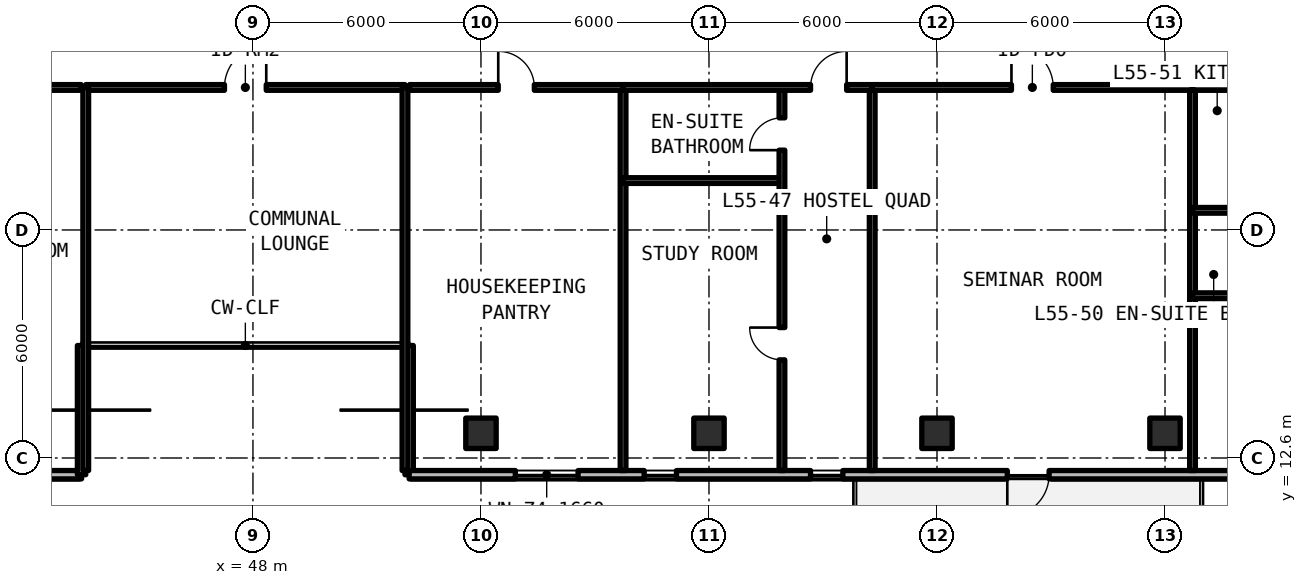
"""IFC4 building model, lengths in metres.
Left out: names, types, materials, properties, quantities, classifications, styles, units other than length and angle.
Written with IfcOpenShell. Run it as: python <this file> out.ifc"""

import sys

from ifc_helpers import new_model, si_unit, direction, frame, frame_2d, origin, origin_2d, place, context, subcontext, project, spatial, rectangle, extrude, element, fill, save


model = new_model("IFC4")
c1 = context("Model", 3, precision=1e-05, world=origin(), true_north=direction((0.0, 1.0)))
c2 = subcontext(c1, "Body", "Model", "MODEL_VIEW")
j1 = project(units=[si_unit("LENGTHUNIT", "METRE"), si_unit("PLANEANGLEUNIT", "RADIAN")], contexts=[c1])
p1 = place(None, origin())
s1 = spatial("IfcSite", under=j1, at=p1, CompositionType="ELEMENT")
p2 = place(p1, origin())
s2 = spatial("IfcBuilding", under=s1, at=p2, CompositionType="ELEMENT")
p3 = place(p2, frame((0.0, 0.0, 198.33)))
s3 = spatial("IfcBuildingStorey", under=s2, at=p3, CompositionType="ELEMENT", Elevation=198.33)
for number, where, z_axis, x_axis in (
    (1, (54.0, 13.25, 0.0), (0.0, 0.0, 1.0), (1.0, 0.0, 0.0)),
    (2, (60.0, 13.25, 0.0), (0.0, 0.0, 1.0), (1.0, 0.0, 0.0)),
    (3, (66.0, 13.25, 0.0), (0.0, 0.0, 1.0), (1.0, 0.0, 0.0)),
    (4, (72.0, 13.25, 0.0), (0.0, 0.0, 1.0), (1.0, 0.0, 0.0)),
):
    element("IfcColumn", number, at=place(p3, frame(where, z_axis=z_axis, x_axis=x_axis)), inside=s3, PredefinedType="COLUMN", context=c2, shape_type="SweptSolid", body=[
        extrude(rectangle(XDim=0.8, YDim=0.8, at=origin_2d()), origin(), (0.0, 0.0, 1.0), 3.3),
    ])
p4 = place(p3, frame((25.846, 12.16, 0.0), z_axis=(0.0, 0.0, 1.0), x_axis=(1.0, 0.0, 0.0)))
e5 = element("IfcWall", 5, at=p4, inside=s3, PredefinedType="SOLIDWALL", context=c2, shape_type="SweptSolid", body=[
    extrude(rectangle(XDim=17.644, YDim=0.22, at=frame_2d((8.822, 0.0))), origin(), (0.0, 0.0, 1.0), 3.08),
])
p5 = place(p4, frame((7.204, 0.0, 0.0)))
e6 = element("IfcOpeningElement", 6, at=p5, cuts=e5, PredefinedType="OPENING", context=c2, shape_type="SweptSolid", body=[
    extrude(rectangle(XDim=1.1, YDim=2.15, at=frame_2d((0.55, 1.075))), frame((0.0, 0.12, 0.0), z_axis=(0.0, -1.0, 0.0), x_axis=(1.0, 0.0, 0.0)), (0.0, 0.0, 1.0), 0.24),
])
p6 = place(p4, frame((0.664, 0.0, 0.78)))
e7 = element("IfcOpeningElement", 7, at=p6, cuts=e5, PredefinedType="OPENING", context=c2, shape_type="SweptSolid", body=[
    extrude(rectangle(XDim=0.85, YDim=1.65, at=frame_2d((0.425, 0.825))), frame((0.0, 0.12, 0.0), z_axis=(0.0, -1.0, 0.0), x_axis=(1.0, 0.0, 0.0)), (0.0, 0.0, 1.0), 0.24),
])
p7 = place(p4, frame((2.636, 0.0, 0.78)))
e8 = element("IfcOpeningElement", 8, at=p7, cuts=e5, PredefinedType="OPENING", context=c2, shape_type="SweptSolid", body=[
    extrude(rectangle(XDim=0.85, YDim=1.65, at=frame_2d((0.425, 0.825))), frame((0.0, 0.12, 0.0), z_axis=(0.0, -1.0, 0.0), x_axis=(1.0, 0.0, 0.0)), (0.0, 0.0, 1.0), 0.24),
])
p8 = place(p4, frame((10.993, 0.0, 0.78)))
e9 = element("IfcOpeningElement", 9, at=p8, cuts=e5, PredefinedType="OPENING", context=c2, shape_type="SweptSolid", body=[
    extrude(rectangle(XDim=0.85, YDim=1.65, at=frame_2d((0.425, 0.825))), frame((0.0, 0.12, 0.0), z_axis=(0.0, -1.0, 0.0), x_axis=(1.0, 0.0, 0.0)), (0.0, 0.0, 1.0), 0.24),
])
p9 = place(p4, frame((14.699, 0.0, 0.78)))
e10 = element("IfcOpeningElement", 10, at=p9, cuts=e5, PredefinedType="OPENING", context=c2, shape_type="SweptSolid", body=[
    extrude(rectangle(XDim=0.85, YDim=1.65, at=frame_2d((0.425, 0.825))), frame((0.0, 0.12, 0.0), z_axis=(0.0, -1.0, 0.0), x_axis=(1.0, 0.0, 0.0)), (0.0, 0.0, 1.0), 0.24),
])
for number, where, z_axis, x_axis in (
    (11, (43.49, 12.16, 0.0), (0.0, 0.0, 1.0), (0.0, 1.0, 0.0)),
    (12, (52.11, 15.56, 0.0), (0.0, 0.0, 1.0), (0.0, -1.0, 0.0)),
):
    element("IfcWall", number, at=place(p3, frame(where, z_axis=z_axis, x_axis=x_axis)), inside=s3, PredefinedType="SOLIDWALL", context=c2, shape_type="SweptSolid", body=[
        extrude(rectangle(XDim=3.4, YDim=0.22, at=frame_2d((1.7, 0.0))), origin(), (0.0, 0.0, 1.0), 3.08),
    ])
p10 = place(p3, frame((52.11, 12.16, 0.0), z_axis=(0.0, 0.0, 1.0), x_axis=(1.0, 0.0, 0.0)))
e13 = element("IfcWall", 13, at=p10, inside=s3, PredefinedType="SOLIDWALL", context=c2, shape_type="SweptSolid", body=[
    extrude(rectangle(XDim=43.244, YDim=0.22, at=frame_2d((21.622, 0.0))), origin(), (0.0, 0.0, 1.0), 3.08),
])
p11 = place(p10, frame((15.74, 0.0, 0.0)))
e14 = element("IfcOpeningElement", 14, at=p11, cuts=e13, PredefinedType="OPENING", context=c2, shape_type="SweptSolid", body=[
    extrude(rectangle(XDim=1.1, YDim=2.15, at=frame_2d((0.55, 1.075))), frame((0.0, 0.12, 0.0), z_axis=(0.0, -1.0, 0.0), x_axis=(1.0, 0.0, 0.0)), (0.0, 0.0, 1.0), 0.24),
])
p12 = place(p10, frame((27.59, 0.0, 0.0)))
e15 = element("IfcOpeningElement", 15, at=p12, cuts=e13, PredefinedType="OPENING", context=c2, shape_type="SweptSolid", body=[
    extrude(rectangle(XDim=1.1, YDim=2.15, at=frame_2d((0.55, 1.075))), frame((0.0, 0.12, 0.0), z_axis=(0.0, -1.0, 0.0), x_axis=(1.0, 0.0, 0.0)), (0.0, 0.0, 1.0), 0.24),
])
p13 = place(p10, frame((2.795, 0.0, 0.78)))
e16 = element("IfcOpeningElement", 16, at=p13, cuts=e13, PredefinedType="OPENING", context=c2, shape_type="SweptSolid", body=[
    extrude(rectangle(XDim=1.65, YDim=1.66, at=frame_2d((0.825, 0.83))), frame((0.0, 0.12, 0.0), z_axis=(0.0, -1.0, 0.0), x_axis=(1.0, 0.0, 0.0)), (0.0, 0.0, 1.0), 0.24),
])
p14 = place(p10, frame((6.185, 0.0, 0.78)))
e17 = element("IfcOpeningElement", 17, at=p14, cuts=e13, PredefinedType="OPENING", context=c2, shape_type="SweptSolid", body=[
    extrude(rectangle(XDim=0.85, YDim=1.65, at=frame_2d((0.425, 0.825))), frame((0.0, 0.12, 0.0), z_axis=(0.0, -1.0, 0.0), x_axis=(1.0, 0.0, 0.0)), (0.0, 0.0, 1.0), 0.24),
])
p15 = place(p10, frame((10.562, 0.0, 0.78)))
e18 = element("IfcOpeningElement", 18, at=p15, cuts=e13, PredefinedType="OPENING", context=c2, shape_type="SweptSolid", body=[
    extrude(rectangle(XDim=0.85, YDim=1.65, at=frame_2d((0.425, 0.825))), frame((0.0, 0.12, 0.0), z_axis=(0.0, -1.0, 0.0), x_axis=(1.0, 0.0, 0.0)), (0.0, 0.0, 1.0), 0.24),
])
p16 = place(p10, frame((22.949, 0.0, 0.78)))
e19 = element("IfcOpeningElement", 19, at=p16, cuts=e13, PredefinedType="OPENING", context=c2, shape_type="SweptSolid", body=[
    extrude(rectangle(XDim=1.65, YDim=1.66, at=frame_2d((0.825, 0.83))), frame((0.0, 0.12, 0.0), z_axis=(0.0, -1.0, 0.0), x_axis=(1.0, 0.0, 0.0)), (0.0, 0.0, 1.0), 0.24),
])
p17 = place(p10, frame((33.573, 0.0, 0.78)))
e20 = element("IfcOpeningElement", 20, at=p17, cuts=e13, PredefinedType="OPENING", context=c2, shape_type="SweptSolid", body=[
    extrude(rectangle(XDim=1.65, YDim=1.66, at=frame_2d((0.825, 0.83))), frame((0.0, 0.12, 0.0), z_axis=(0.0, -1.0, 0.0), x_axis=(1.0, 0.0, 0.0)), (0.0, 0.0, 1.0), 0.24),
])
p18 = place(p10, frame((38.514, 0.0, 0.78)))
e21 = element("IfcOpeningElement", 21, at=p18, cuts=e13, PredefinedType="OPENING", context=c2, shape_type="SweptSolid", body=[
    extrude(rectangle(XDim=0.85, YDim=1.65, at=frame_2d((0.425, 0.825))), frame((0.0, 0.12, 0.0), z_axis=(0.0, -1.0, 0.0), x_axis=(1.0, 0.0, 0.0)), (0.0, 0.0, 1.0), 0.24),
])
p19 = place(p10, frame((40.615, 0.0, 0.78)))
e22 = element("IfcOpeningElement", 22, at=p19, cuts=e13, PredefinedType="OPENING", context=c2, shape_type="SweptSolid", body=[
    extrude(rectangle(XDim=1.65, YDim=1.66, at=frame_2d((0.825, 0.83))), frame((0.0, 0.12, 0.0), z_axis=(0.0, -1.0, 0.0), x_axis=(1.0, 0.0, 0.0)), (0.0, 0.0, 1.0), 0.24),
])
p20 = place(p3, frame((43.6, 22.35, 0.0), z_axis=(0.0, 0.0, 1.0), x_axis=(1.0, 0.0, 0.0)))
e23 = element("IfcWall", 23, at=p20, inside=s3, PredefinedType="SOLIDWALL", context=c2, shape_type="SweptSolid", body=[
    extrude(rectangle(XDim=8.4, YDim=0.15, at=frame_2d((4.2, 0.0))), origin(), (0.0, 0.0, 1.0), 2.35),
])
p21 = place(p20, frame((3.65, 0.0, 0.0)))
e24 = element("IfcOpeningElement", 24, at=p21, cuts=e23, PredefinedType="OPENING", context=c2, shape_type="SweptSolid", body=[
    extrude(rectangle(XDim=1.1, YDim=2.15, at=frame_2d((0.55, 1.075))), frame((0.0, 0.085, 0.0), z_axis=(0.0, -1.0, 0.0), x_axis=(1.0, 0.0, 0.0)), (0.0, 0.0, 1.0), 0.17),
])
for number, where, z_axis, x_axis in (
    (25, (43.6, 12.27, 0.0), (0.0, 0.0, 1.0), (0.0, 1.0, 0.0)),
    (26, (52.0, 12.27, 0.0), (0.0, 0.0, 1.0), (0.0, 1.0, 0.0)),
):
    element("IfcWall", number, at=place(p3, frame(where, z_axis=z_axis, x_axis=x_axis)), inside=s3, PredefinedType="SOLIDWALL", context=c2, shape_type="SweptSolid", body=[
        extrude(rectangle(XDim=10.08, YDim=0.15, at=frame_2d((5.04, 0.0))), origin(), (0.0, 0.0, 1.0), 2.35),
    ])
p22 = place(p3, frame((38.713, 22.35, 0.0), z_axis=(0.0, 0.0, 1.0), x_axis=(1.0, 0.0, 0.0)))
e27 = element("IfcWall", 27, at=p22, inside=s3, PredefinedType="SOLIDWALL", context=c2, shape_type="SweptSolid", body=[
    extrude(rectangle(XDim=4.767, YDim=0.15, at=frame_2d((2.384, 0.0))), origin(), (0.0, 0.0, 1.0), 2.35),
])
p23 = place(p22, frame((2.632, 0.0, 0.0)))
e28 = element("IfcOpeningElement", 28, at=p23, cuts=e27, PredefinedType="OPENING", context=c2, shape_type="SweptSolid", body=[
    extrude(rectangle(XDim=0.95, YDim=2.15, at=frame_2d((0.475, 1.075))), frame((0.0, 0.085, 0.0), z_axis=(0.0, -1.0, 0.0), x_axis=(1.0, 0.0, 0.0)), (0.0, 0.0, 1.0), 0.17),
])
p24 = place(p3, frame((57.739, 12.27, 0.0), z_axis=(0.0, 0.0, 1.0), x_axis=(0.0, 1.0, 0.0)))
e29 = element("IfcWall", 29, at=p24, inside=s3, PredefinedType="SOLIDWALL", context=c2, shape_type="SweptSolid", body=[
    extrude(rectangle(XDim=10.08, YDim=0.15, at=frame_2d((5.04, 0.0))), origin(), (0.0, 0.0, 1.0), 2.35),
])
p25 = place(p3, frame((52.12, 22.35, 0.0), z_axis=(0.0, 0.0, 1.0), x_axis=(1.0, 0.0, 0.0)))
e30 = element("IfcWall", 30, at=p25, inside=s3, PredefinedType="SOLIDWALL", context=c2, shape_type="SweptSolid", body=[
    extrude(rectangle(XDim=5.619, YDim=0.15, at=frame_2d((2.81, 0.0))), origin(), (0.0, 0.0, 1.0), 2.35),
])
p26 = place(p25, frame((2.335, 0.0, 0.0)))
e31 = element("IfcOpeningElement", 31, at=p26, cuts=e30, PredefinedType="OPENING", context=c2, shape_type="SweptSolid", body=[
    extrude(rectangle(XDim=0.95, YDim=2.15, at=frame_2d((0.475, 1.075))), frame((0.0, 0.085, 0.0), z_axis=(0.0, -1.0, 0.0), x_axis=(1.0, 0.0, 0.0)), (0.0, 0.0, 1.0), 0.17),
])
p27 = place(p3, frame((64.295, 12.27, 0.0), z_axis=(0.0, 0.0, 1.0), x_axis=(0.0, 1.0, 0.0)))
e32 = element("IfcWall", 32, at=p27, inside=s3, PredefinedType="SOLIDWALL", context=c2, shape_type="SweptSolid", body=[
    extrude(rectangle(XDim=10.08, YDim=0.15, at=frame_2d((5.04, 0.0))), origin(), (0.0, 0.0, 1.0), 2.35),
])
p28 = place(p3, frame((57.739, 19.9, 0.0), z_axis=(0.0, 0.0, 1.0), x_axis=(1.0, 0.0, 0.0)))
e33 = element("IfcWall", 33, at=p28, inside=s3, PredefinedType="PARTITIONING", context=c2, shape_type="SweptSolid", body=[
    extrude(rectangle(XDim=4.181, YDim=0.15, at=frame_2d((2.09, 0.0))), origin(), (0.0, 0.0, 1.0), 2.35),
])
p29 = place(p3, frame((61.92, 12.27, 0.0), z_axis=(0.0, 0.0, 1.0), x_axis=(0.0, 1.0, 0.0)))
e34 = element("IfcWall", 34, at=p29, inside=s3, PredefinedType="PARTITIONING", context=c2, shape_type="SweptSolid", body=[
    extrude(rectangle(XDim=10.08, YDim=0.15, at=frame_2d((5.04, 0.0))), origin(), (0.0, 0.0, 1.0), 2.35),
])
p30 = place(p29, frame((2.912, 0.0, 0.0)))
e35 = element("IfcOpeningElement", 35, at=p30, cuts=e34, PredefinedType="OPENING", context=c2, shape_type="SweptSolid", body=[
    extrude(rectangle(XDim=0.85, YDim=2.1, at=frame_2d((0.425, 1.05))), frame((0.0, 0.085, 0.0), z_axis=(0.0, -1.0, 0.0), x_axis=(1.0, 0.0, 0.0)), (0.0, 0.0, 1.0), 0.17),
])
p31 = place(p29, frame((8.43, 0.0, 0.0)))
e36 = element("IfcOpeningElement", 36, at=p31, cuts=e34, PredefinedType="OPENING", context=c2, shape_type="SweptSolid", body=[
    extrude(rectangle(XDim=0.85, YDim=2.1, at=frame_2d((0.425, 1.05))), frame((0.0, 0.085, 0.0), z_axis=(0.0, -1.0, 0.0), x_axis=(1.0, 0.0, 0.0)), (0.0, 0.0, 1.0), 0.17),
])
p32 = place(p3, frame((57.739, 22.35, 0.0), z_axis=(0.0, 0.0, 1.0), x_axis=(1.0, 0.0, 0.0)))
e37 = element("IfcWall", 37, at=p32, inside=s3, PredefinedType="SOLIDWALL", context=c2, shape_type="SweptSolid", body=[
    extrude(rectangle(XDim=6.556, YDim=0.15, at=frame_2d((3.278, 0.0))), origin(), (0.0, 0.0, 1.0), 2.35),
])
p33 = place(p32, frame((4.933, 0.0, 0.0)))
e38 = element("IfcOpeningElement", 38, at=p33, cuts=e37, PredefinedType="OPENING", context=c2, shape_type="SweptSolid", body=[
    extrude(rectangle(XDim=0.95, YDim=2.15, at=frame_2d((0.475, 1.075))), frame((0.0, 0.085, 0.0), z_axis=(0.0, -1.0, 0.0), x_axis=(1.0, 0.0, 0.0)), (0.0, 0.0, 1.0), 0.17),
])
p34 = place(p3, frame((72.723, 12.27, 0.0), z_axis=(0.0, 0.0, 1.0), x_axis=(0.0, 1.0, 0.0)))
e39 = element("IfcWall", 39, at=p34, inside=s3, PredefinedType="SOLIDWALL", context=c2, shape_type="SweptSolid", body=[
    extrude(rectangle(XDim=10.08, YDim=0.15, at=frame_2d((5.04, 0.0))), origin(), (0.0, 0.0, 1.0), 2.35),
])
p35 = place(p3, frame((64.295, 22.35, 0.0), z_axis=(0.0, 0.0, 1.0), x_axis=(1.0, 0.0, 0.0)))
e40 = element("IfcWall", 40, at=p35, inside=s3, PredefinedType="SOLIDWALL", context=c2, shape_type="SweptSolid", body=[
    extrude(rectangle(XDim=8.428, YDim=0.15, at=frame_2d((4.214, 0.0))), origin(), (0.0, 0.0, 1.0), 2.35),
])
p36 = place(p35, frame((3.664, 0.0, 0.0)))
e41 = element("IfcOpeningElement", 41, at=p36, cuts=e40, PredefinedType="OPENING", context=c2, shape_type="SweptSolid", body=[
    extrude(rectangle(XDim=1.1, YDim=2.15, at=frame_2d((0.55, 1.075))), frame((0.0, 0.085, 0.0), z_axis=(0.0, -1.0, 0.0), x_axis=(1.0, 0.0, 0.0)), (0.0, 0.0, 1.0), 0.17),
])
p37 = place(p3, frame((72.723, 19.117, 0.0), z_axis=(0.0, 0.0, 1.0), x_axis=(1.0, 0.0, 0.0)))
e42 = element("IfcWall", 42, at=p37, inside=s3, PredefinedType="PARTITIONING", context=c2, shape_type="SweptSolid", body=[
    extrude(rectangle(XDim=2.149, YDim=0.15, at=frame_2d((1.075, 0.0))), origin(), (0.0, 0.0, 1.0), 2.35),
])
p38 = place(p3, frame((72.723, 16.87, 0.0), z_axis=(0.0, 0.0, 1.0), x_axis=(1.0, 0.0, 0.0)))
e43 = element("IfcWall", 43, at=p38, inside=s3, PredefinedType="PARTITIONING", context=c2, shape_type="SweptSolid", body=[
    extrude(rectangle(XDim=6.322, YDim=0.15, at=frame_2d((3.161, 0.0))), origin(), (0.0, 0.0, 1.0), 2.35),
])
p39 = place(p38, frame((3.85, 0.0, 0.0)))
e44 = element("IfcOpeningElement", 44, at=p39, cuts=e43, PredefinedType="OPENING", context=c2, shape_type="SweptSolid", body=[
    extrude(rectangle(XDim=0.85, YDim=2.1, at=frame_2d((0.425, 1.05))), frame((0.0, 0.085, 0.0), z_axis=(0.0, -1.0, 0.0), x_axis=(1.0, 0.0, 0.0)), (0.0, 0.0, 1.0), 0.17),
])
p40 = place(p3, frame((72.723, 22.35, 0.0), z_axis=(0.0, 0.0, 1.0), x_axis=(1.0, 0.0, 0.0)))
e45 = element("IfcWall", 45, at=p40, inside=s3, PredefinedType="SOLIDWALL", context=c2, shape_type="SweptSolid", body=[
    extrude(rectangle(XDim=6.322, YDim=0.15, at=frame_2d((3.161, 0.0))), origin(), (0.0, 0.0, 1.0), 2.35),
])
p41 = place(p40, frame((3.8, 0.0, 0.0)))
e46 = element("IfcOpeningElement", 46, at=p41, cuts=e45, PredefinedType="OPENING", context=c2, shape_type="SweptSolid", body=[
    extrude(rectangle(XDim=0.95, YDim=2.15, at=frame_2d((0.475, 1.075))), frame((0.0, 0.085, 0.0), z_axis=(0.0, -1.0, 0.0), x_axis=(1.0, 0.0, 0.0)), (0.0, 0.0, 1.0), 0.17),
])
p42 = place(p11, frame((1.1, 0.0, 0.0), z_axis=(0.0, 0.0, 1.0), x_axis=(-1.0, 0.0, 0.0)))
e47 = element("IfcDoor", 47, at=p42, inside=s3, OperationType="SINGLE_SWING_RIGHT", PredefinedType="DOOR", context=c2, shape_type="SweptSolid", body=[
    extrude(rectangle(XDim=1.1, YDim=2.15, at=frame_2d((0.55, 1.075))), frame((0.0, 0.025, 0.0), z_axis=(0.0, -1.0, 0.0), x_axis=(1.0, 0.0, 0.0)), (0.0, 0.0, 1.0), 0.05),
])
fill(e14, e47)
p43 = place(p13, origin())
e48 = element("IfcWindow", 48, at=p43, inside=s3, PartitioningType="SINGLE_PANEL", PredefinedType="WINDOW", context=c2, shape_type="SweptSolid", body=[
    extrude(rectangle(XDim=1.65, YDim=1.66, at=frame_2d((0.825, 0.83))), frame((0.0, 0.03, 0.0), z_axis=(0.0, -1.0, 0.0), x_axis=(1.0, 0.0, 0.0)), (0.0, 0.0, 1.0), 0.06),
])
fill(e16, e48)
p44 = place(p14, origin())
e49 = element("IfcWindow", 49, at=p44, inside=s3, PartitioningType="SINGLE_PANEL", PredefinedType="WINDOW", context=c2, shape_type="SweptSolid", body=[
    extrude(rectangle(XDim=0.85, YDim=1.65, at=frame_2d((0.425, 0.825))), frame((0.0, 0.03, 0.0), z_axis=(0.0, -1.0, 0.0), x_axis=(1.0, 0.0, 0.0)), (0.0, 0.0, 1.0), 0.06),
])
fill(e17, e49)
p45 = place(p15, origin())
e50 = element("IfcWindow", 50, at=p45, inside=s3, PartitioningType="SINGLE_PANEL", PredefinedType="WINDOW", context=c2, shape_type="SweptSolid", body=[
    extrude(rectangle(XDim=0.85, YDim=1.65, at=frame_2d((0.425, 0.825))), frame((0.0, 0.03, 0.0), z_axis=(0.0, -1.0, 0.0), x_axis=(1.0, 0.0, 0.0)), (0.0, 0.0, 1.0), 0.06),
])
fill(e18, e50)
p46 = place(p21, origin())
e51 = element("IfcDoor", 51, at=p46, inside=s3, OperationType="SINGLE_SWING_RIGHT", PredefinedType="DOOR", context=c2, shape_type="SweptSolid", body=[
    extrude(rectangle(XDim=1.1, YDim=2.15, at=frame_2d((0.55, 1.075))), frame((0.0, 0.025, 0.0), z_axis=(0.0, -1.0, 0.0), x_axis=(1.0, 0.0, 0.0)), (0.0, 0.0, 1.0), 0.05),
])
fill(e24, e51)
p47 = place(p26, origin())
e52 = element("IfcDoor", 52, at=p47, inside=s3, OperationType="SINGLE_SWING_LEFT", PredefinedType="DOOR", context=c2, shape_type="SweptSolid", body=[
    extrude(rectangle(XDim=0.95, YDim=2.15, at=frame_2d((0.475, 1.075))), frame((0.0, 0.025, 0.0), z_axis=(0.0, -1.0, 0.0), x_axis=(1.0, 0.0, 0.0)), (0.0, 0.0, 1.0), 0.05),
])
fill(e31, e52)
p48 = place(p30, origin())
e53 = element("IfcDoor", 53, at=p48, inside=s3, OperationType="SINGLE_SWING_RIGHT", PredefinedType="DOOR", context=c2, shape_type="SweptSolid", body=[
    extrude(rectangle(XDim=0.85, YDim=2.1, at=frame_2d((0.425, 1.05))), frame((0.0, 0.025, 0.0), z_axis=(0.0, -1.0, 0.0), x_axis=(1.0, 0.0, 0.0)), (0.0, 0.0, 1.0), 0.05),
])
fill(e35, e53)
p49 = place(p31, origin())
e54 = element("IfcDoor", 54, at=p49, inside=s3, OperationType="SINGLE_SWING_LEFT", PredefinedType="DOOR", context=c2, shape_type="SweptSolid", body=[
    extrude(rectangle(XDim=0.85, YDim=2.1, at=frame_2d((0.425, 1.05))), frame((0.0, 0.025, 0.0), z_axis=(0.0, -1.0, 0.0), x_axis=(1.0, 0.0, 0.0)), (0.0, 0.0, 1.0), 0.05),
])
fill(e36, e54)
p50 = place(p33, origin())
e55 = element("IfcDoor", 55, at=p50, inside=s3, OperationType="SINGLE_SWING_RIGHT", PredefinedType="DOOR", context=c2, shape_type="SweptSolid", body=[
    extrude(rectangle(XDim=0.95, YDim=2.15, at=frame_2d((0.475, 1.075))), frame((0.0, 0.025, 0.0), z_axis=(0.0, -1.0, 0.0), x_axis=(1.0, 0.0, 0.0)), (0.0, 0.0, 1.0), 0.05),
])
fill(e38, e55)
p51 = place(p36, origin())
e56 = element("IfcDoor", 56, at=p51, inside=s3, OperationType="SINGLE_SWING_LEFT", PredefinedType="DOOR", context=c2, shape_type="SweptSolid", body=[
    extrude(rectangle(XDim=1.1, YDim=2.15, at=frame_2d((0.55, 1.075))), frame((0.0, 0.025, 0.0), z_axis=(0.0, -1.0, 0.0), x_axis=(1.0, 0.0, 0.0)), (0.0, 0.0, 1.0), 0.05),
])
fill(e41, e56)
save(model, sys.argv[1])
